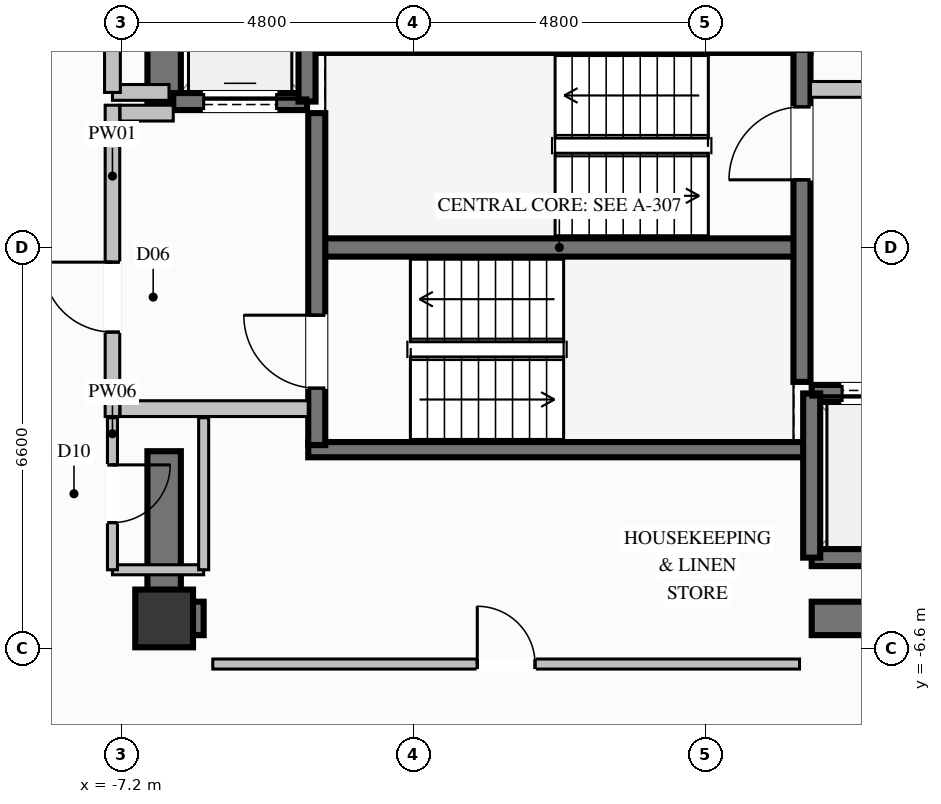
"""IFC4 building model, lengths in metres.
Left out: names, types, materials, properties, quantities, classifications, styles, units other than length and angle.
Written with IfcOpenShell. Run it as: python <this file> out.ifc"""

import sys

from ifc_helpers import new_model, si_unit, direction, frame, frame_2d, origin, origin_2d, place, context, subcontext, project, spatial, rectangle, extrude, element, fill, save


model = new_model("IFC4")
c1 = context("Model", 3, precision=1e-05, world=origin(), true_north=direction((0.0, 1.0)))
c2 = subcontext(c1, "Body", "Model", "MODEL_VIEW")
j1 = project(units=[si_unit("LENGTHUNIT", "METRE"), si_unit("PLANEANGLEUNIT", "RADIAN")], contexts=[c1])
p1 = place(None, origin())
s1 = spatial("IfcSite", under=j1, at=p1, CompositionType="ELEMENT")
p2 = place(p1, origin())
s2 = spatial("IfcBuilding", under=s1, at=p2, CompositionType="ELEMENT")
p3 = place(p2, frame((0.0, 0.0, 202.0)))
s3 = spatial("IfcBuildingStorey", under=s2, at=p3, CompositionType="ELEMENT", Elevation=202.0)
p4 = place(p3, frame((-6.5, -6.1, 0.0), z_axis=(0.0, 0.0, 1.0), x_axis=(1.0, 0.0, 0.0)))
e1 = element("IfcColumn", 1, at=p4, inside=s3, PredefinedType="COLUMN", context=c2, shape_type="SweptSolid", body=[
    extrude(rectangle(XDim=0.95, YDim=0.95, at=origin_2d()), origin(), (0.0, 0.0, 1.0), 3.6),
])
p5 = place(p3, frame((-3.99, 0.0, 0.0), z_axis=(0.0, 0.0, 1.0), x_axis=(1.0, 0.0, 0.0)))
e2 = element("IfcWall", 2, at=p5, inside=s3, PredefinedType="SHEAR", context=c2, shape_type="SweptSolid", body=[
    extrude(rectangle(XDim=7.98, YDim=0.3, at=frame_2d((3.99, 0.0))), origin(), (0.0, 0.0, 1.0), 3.6),
])
for number, where, z_axis, x_axis in (
    (3, (-4.13, -3.325, 0.0), (0.0, 0.0, 1.0), (1.0, 0.0, 0.0)),
    (4, (-4.13, 3.325, 0.0), (0.0, 0.0, 1.0), (1.0, 0.0, 0.0)),
):
    element("IfcWall", number, at=place(p3, frame(where, z_axis=z_axis, x_axis=x_axis)), inside=s3, PredefinedType="SOLIDWALL", context=c2, shape_type="SweptSolid", body=[
        extrude(rectangle(XDim=8.26, YDim=0.25, at=frame_2d((4.13, 0.0))), origin(), (0.0, 0.0, 1.0), 3.6),
    ])
p6 = place(p3, frame((-6.225, -6.1, 0.0), z_axis=(0.0, 0.0, 1.0), x_axis=(1.0, 0.0, 0.0)))
e5 = element("IfcWall", 5, at=p6, inside=s3, PredefinedType="SHEAR", context=c2, shape_type="SweptSolid", body=[
    extrude(rectangle(XDim=0.375, YDim=0.55, at=frame_2d((0.188, 0.0))), origin(), (0.0, 0.0, 1.0), 3.6),
])
p7 = place(p3, frame((4.15, -6.1, 0.0), z_axis=(0.0, 0.0, 1.0), x_axis=(1.0, 0.0, 0.0)))
e6 = element("IfcWall", 6, at=p7, inside=s3, PredefinedType="SHEAR", context=c2, shape_type="SweptSolid", body=[
    extrude(rectangle(XDim=2.075, YDim=0.55, at=frame_2d((1.038, 0.0))), origin(), (0.0, 0.0, 1.0), 3.6),
])
p8 = place(p3, frame((-6.5, 2.35, 0.0), z_axis=(0.0, 0.0, 1.0), x_axis=(0.0, 1.0, 0.0)))
e7 = element("IfcWall", 7, at=p8, inside=s3, PredefinedType="SHEAR", context=c2, shape_type="SweptSolid", body=[
    extrude(rectangle(XDim=4.025, YDim=0.55, at=frame_2d((2.012, 0.0))), origin(), (0.0, 0.0, 1.0), 3.6),
])
p9 = place(p3, frame((-6.5, -6.375, 0.0), z_axis=(0.0, 0.0, 1.0), x_axis=(0.0, 1.0, 0.0)))
e8 = element("IfcWall", 8, at=p9, inside=s3, PredefinedType="SHEAR", context=c2, shape_type="SweptSolid", body=[
    extrude(rectangle(XDim=3.025, YDim=0.55, at=frame_2d((1.512, 0.0))), origin(), (0.0, 0.0, 1.0), 3.6),
])
p10 = place(p3, frame((-6.35, 2.4, 0.0), z_axis=(0.0, 0.0, 1.0), x_axis=(1.0, 0.0, 0.0)))
e9 = element("IfcWall", 9, at=p10, inside=s3, PredefinedType="SOLIDWALL", context=c2, shape_type="SweptSolid", body=[
    extrude(rectangle(XDim=2.2, YDim=0.28, at=frame_2d((1.1, 0.0))), origin(), (0.0, 0.0, 1.0), 3.36),
])
p11 = place(p10, frame((0.5, 0.0, 0.0)))
e10 = element("IfcOpeningElement", 10, at=p11, cuts=e9, PredefinedType="OPENING", context=c2, shape_type="SweptSolid", body=[
    extrude(rectangle(XDim=1.2, YDim=2.2, at=frame_2d((0.6, 1.1))), frame((0.0, 0.15, 0.0), z_axis=(0.0, -1.0, 0.0), x_axis=(1.0, 0.0, 0.0)), (0.0, 0.0, 1.0), 0.3),
])
p12 = place(p3, frame((-4.15, 2.4, 0.0), z_axis=(0.0, 0.0, 1.0), x_axis=(0.0, 1.0, 0.0)))
e11 = element("IfcWall", 11, at=p12, inside=s3, PredefinedType="SOLIDWALL", context=c2, shape_type="SweptSolid", body=[
    extrude(rectangle(XDim=2.7, YDim=0.28, at=frame_2d((1.35, 0.0))), origin(), (0.0, 0.0, 1.0), 3.36),
])
p13 = place(p3, frame((4.15, -5.1, 0.0), z_axis=(0.0, 0.0, 1.0), x_axis=(1.0, 0.0, 0.0)))
e12 = element("IfcWall", 12, at=p13, inside=s3, PredefinedType="SOLIDWALL", context=c2, shape_type="SweptSolid", body=[
    extrude(rectangle(XDim=2.2, YDim=0.28, at=frame_2d((1.1, 0.0))), origin(), (0.0, 0.0, 1.0), 3.36),
])
p14 = place(p3, frame((6.35, -2.4, 0.0), z_axis=(0.0, 0.0, 1.0), x_axis=(-1.0, 0.0, 0.0)))
e13 = element("IfcWall", 13, at=p14, inside=s3, PredefinedType="SOLIDWALL", context=c2, shape_type="SweptSolid", body=[
    extrude(rectangle(XDim=2.2, YDim=0.28, at=frame_2d((1.1, 0.0))), origin(), (0.0, 0.0, 1.0), 3.36),
])
p15 = place(p14, frame((0.5, 0.0, 0.0)))
e14 = element("IfcOpeningElement", 14, at=p15, cuts=e13, PredefinedType="OPENING", context=c2, shape_type="SweptSolid", body=[
    extrude(rectangle(XDim=1.2, YDim=2.2, at=frame_2d((0.6, 1.1))), frame((0.0, 0.15, 0.0), z_axis=(0.0, -1.0, 0.0), x_axis=(1.0, 0.0, 0.0)), (0.0, 0.0, 1.0), 0.3),
])
p16 = place(p3, frame((4.15, -2.4, 0.0), z_axis=(0.0, 0.0, 1.0), x_axis=(0.0, -1.0, 0.0)))
e15 = element("IfcWall", 15, at=p16, inside=s3, PredefinedType="SOLIDWALL", context=c2, shape_type="SweptSolid", body=[
    extrude(rectangle(XDim=2.7, YDim=0.28, at=frame_2d((1.35, 0.0))), origin(), (0.0, 0.0, 1.0), 3.36),
])
p17 = place(p3, frame((-3.99, -3.25, 0.0), z_axis=(0.0, 0.0, 1.0), x_axis=(0.0, 1.0, 0.0)))
e16 = element("IfcWall", 16, at=p17, inside=s3, PredefinedType="SOLIDWALL", context=c2, shape_type="SweptSolid", body=[
    extrude(rectangle(XDim=5.46, YDim=0.28, at=frame_2d((2.73, 0.0))), origin(), (0.0, 0.0, 1.0), 3.36),
])
p18 = place(p17, frame((0.937, 0.0, 0.0)))
e17 = element("IfcOpeningElement", 17, at=p18, cuts=e16, PredefinedType="OPENING", context=c2, shape_type="SweptSolid", body=[
    extrude(rectangle(XDim=1.2, YDim=2.2, at=frame_2d((0.6, 1.1))), frame((0.0, 0.15, 0.0), z_axis=(0.0, -1.0, 0.0), x_axis=(1.0, 0.0, 0.0)), (0.0, 0.0, 1.0), 0.3),
])
p19 = place(p3, frame((3.99, -2.21, 0.0), z_axis=(0.0, 0.0, 1.0), x_axis=(0.0, 1.0, 0.0)))
e18 = element("IfcWall", 18, at=p19, inside=s3, PredefinedType="SOLIDWALL", context=c2, shape_type="SweptSolid", body=[
    extrude(rectangle(XDim=5.46, YDim=0.28, at=frame_2d((2.73, 0.0))), origin(), (0.0, 0.0, 1.0), 3.36),
])
p20 = place(p19, frame((3.323, 0.0, 0.0)))
e19 = element("IfcOpeningElement", 19, at=p20, cuts=e18, PredefinedType="OPENING", context=c2, shape_type="SweptSolid", body=[
    extrude(rectangle(XDim=1.2, YDim=2.2, at=frame_2d((0.6, 1.1))), frame((0.0, 0.15, 0.0), z_axis=(0.0, -1.0, 0.0), x_axis=(1.0, 0.0, 0.0)), (0.0, 0.0, 1.0), 0.3),
])
p21 = place(p3, frame((-7.35, -2.78, 0.0), z_axis=(0.0, 0.0, 1.0), x_axis=(0.0, 1.0, 0.0)))
e20 = element("IfcWall", 20, at=p21, inside=s3, PredefinedType="PARTITIONING", context=c2, shape_type="SweptSolid", body=[
    extrude(rectangle(XDim=5.12, YDim=0.24, at=frame_2d((2.56, 0.0))), origin(), (0.0, 0.0, 1.0), 2.445),
])
p22 = place(p21, frame((1.389, 0.0, 0.0)))
e21 = element("IfcOpeningElement", 21, at=p22, cuts=e20, PredefinedType="OPENING", context=c2, shape_type="SweptSolid", body=[
    extrude(rectangle(XDim=1.15, YDim=2.2, at=frame_2d((0.575, 1.1))), frame((0.0, 0.13, 0.0), z_axis=(0.0, -1.0, 0.0), x_axis=(1.0, 0.0, 0.0)), (0.0, 0.0, 1.0), 0.26),
])
p23 = place(p3, frame((-7.225, -2.65, 0.0), z_axis=(0.0, 0.0, 1.0), x_axis=(1.0, 0.0, 0.0)))
e22 = element("IfcWall", 22, at=p23, inside=s3, PredefinedType="PARTITIONING", context=c2, shape_type="SweptSolid", body=[
    extrude(rectangle(XDim=3.095, YDim=0.26, at=frame_2d((1.548, 0.0))), origin(), (0.0, 0.0, 1.0), 3.36),
])
p24 = place(p3, frame((-7.225, 2.21, 0.0), z_axis=(0.0, 0.0, 1.0), x_axis=(1.0, 0.0, 0.0)))
e23 = element("IfcWall", 23, at=p24, inside=s3, PredefinedType="PARTITIONING", context=c2, shape_type="SweptSolid", body=[
    extrude(rectangle(XDim=0.875, YDim=0.26, at=frame_2d((0.438, 0.0))), origin(), (0.0, 0.0, 1.0), 3.36),
])
p25 = place(p3, frame((4.13, 2.6, 0.0), z_axis=(0.0, 0.0, 1.0), x_axis=(1.0, 0.0, 0.0)))
e24 = element("IfcWall", 24, at=p25, inside=s3, PredefinedType="PARTITIONING", context=c2, shape_type="SweptSolid", body=[
    extrude(rectangle(XDim=3.095, YDim=0.26, at=frame_2d((1.548, 0.0))), origin(), (0.0, 0.0, 1.0), 3.36),
])
p26 = place(p3, frame((-7.35, 2.55, 0.0), z_axis=(0.0, 0.0, 1.0), x_axis=(1.0, 0.0, 0.0)))
e25 = element("IfcWall", 25, at=p26, inside=s3, PredefinedType="PARTITIONING", context=c2, shape_type="SweptSolid", body=[
    extrude(rectangle(XDim=0.93, YDim=0.26, at=frame_2d((0.465, 0.0))), origin(), (0.0, 0.0, 1.0), 3.36),
])
p27 = place(p3, frame((-7.35, 2.55, 0.0), z_axis=(0.0, 0.0, 1.0), x_axis=(0.0, 1.0, 0.0)))
e26 = element("IfcWall", 26, at=p27, inside=s3, PredefinedType="PARTITIONING", context=c2, shape_type="SweptSolid", body=[
    extrude(rectangle(XDim=2.4, YDim=0.26, at=frame_2d((1.2, 0.0))), origin(), (0.0, 0.0, 1.0), 2.445),
])
p28 = place(p27, frame((0.775, 0.0, 0.0)))
e27 = element("IfcOpeningElement", 27, at=p28, cuts=e26, PredefinedType="OPENING", context=c2, shape_type="SweptSolid", body=[
    extrude(rectangle(XDim=0.85, YDim=2.05, at=frame_2d((0.425, 1.025))), frame((0.0, 0.14, 0.0), z_axis=(0.0, -1.0, 0.0), x_axis=(1.0, 0.0, 0.0)), (0.0, 0.0, 1.0), 0.28),
])
p29 = place(p3, frame((-7.35, -5.3, 0.0), z_axis=(0.0, 0.0, 1.0), x_axis=(1.0, 0.0, 0.0)))
e28 = element("IfcWall", 28, at=p29, inside=s3, PredefinedType="PARTITIONING", context=c2, shape_type="SweptSolid", body=[
    extrude(rectangle(XDim=1.5, YDim=0.165, at=frame_2d((0.75, 0.0))), origin(), (0.0, 0.0, 1.0), 2.445),
])
p30 = place(p3, frame((-5.85, -5.3, 0.0), z_axis=(0.0, 0.0, 1.0), x_axis=(0.0, 1.0, 0.0)))
e29 = element("IfcWall", 29, at=p30, inside=s3, PredefinedType="PARTITIONING", context=c2, shape_type="SweptSolid", body=[
    extrude(rectangle(XDim=2.5, YDim=0.165, at=frame_2d((1.25, 0.0))), origin(), (0.0, 0.0, 1.0), 2.445),
])
p31 = place(p3, frame((-7.35, -2.8, 0.0), z_axis=(0.0, 0.0, 1.0), x_axis=(0.0, -1.0, 0.0)))
e30 = element("IfcWall", 30, at=p31, inside=s3, PredefinedType="PARTITIONING", context=c2, shape_type="SweptSolid", body=[
    extrude(rectangle(XDim=2.5, YDim=0.165, at=frame_2d((1.25, 0.0))), origin(), (0.0, 0.0, 1.0), 3.36),
])
p32 = place(p31, frame((0.775, 0.0, 0.0)))
e31 = element("IfcOpeningElement", 31, at=p32, cuts=e30, PredefinedType="OPENING", context=c2, shape_type="SweptSolid", body=[
    extrude(rectangle(XDim=0.95, YDim=2.1, at=frame_2d((0.475, 1.05))), frame((0.0, 0.093, 0.0), z_axis=(0.0, -1.0, 0.0), x_axis=(1.0, 0.0, 0.0)), (0.0, 0.0, 1.0), 0.185),
])
p33 = place(p3, frame((-5.7, -6.85, 0.0), z_axis=(0.0, 0.0, 1.0), x_axis=(1.0, 0.0, 0.0)))
e32 = element("IfcWall", 32, at=p33, inside=s3, PredefinedType="PARTITIONING", context=c2, shape_type="SweptSolid", body=[
    extrude(rectangle(XDim=9.65, YDim=0.165, at=frame_2d((4.825, 0.0))), origin(), (0.0, 0.0, 1.0), 2.445),
])
p34 = place(p33, frame((4.35, 0.0, 0.0)))
e33 = element("IfcOpeningElement", 33, at=p34, cuts=e32, PredefinedType="OPENING", context=c2, shape_type="SweptSolid", body=[
    extrude(rectangle(XDim=0.95, YDim=2.1, at=frame_2d((0.475, 1.05))), frame((0.0, 0.093, 0.0), z_axis=(0.0, -1.0, 0.0), x_axis=(1.0, 0.0, 0.0)), (0.0, 0.0, 1.0), 0.185),
])
p35 = place(p11, origin())
e34 = element("IfcDoor", 34, at=p35, inside=s3, OperationType="SLIDING_TO_LEFT", PredefinedType="DOOR", context=c2, shape_type="SweptSolid", body=[
    extrude(rectangle(XDim=1.2, YDim=2.2, at=frame_2d((0.6, 1.1))), frame((0.0, 0.025, 0.0), z_axis=(0.0, -1.0, 0.0), x_axis=(1.0, 0.0, 0.0)), (0.0, 0.0, 1.0), 0.05),
])
fill(e10, e34)
p36 = place(p15, origin())
e35 = element("IfcDoor", 35, at=p36, inside=s3, OperationType="SLIDING_TO_LEFT", PredefinedType="DOOR", context=c2, shape_type="SweptSolid", body=[
    extrude(rectangle(XDim=1.2, YDim=2.2, at=frame_2d((0.6, 1.1))), frame((0.0, 0.025, 0.0), z_axis=(0.0, -1.0, 0.0), x_axis=(1.0, 0.0, 0.0)), (0.0, 0.0, 1.0), 0.05),
])
fill(e14, e35)
p37 = place(p18, origin())
e36 = element("IfcDoor", 36, at=p37, inside=s3, OperationType="SINGLE_SWING_RIGHT", PredefinedType="DOOR", context=c2, shape_type="SweptSolid", body=[
    extrude(rectangle(XDim=1.2, YDim=2.2, at=frame_2d((0.6, 1.1))), frame((0.0, 0.025, 0.0), z_axis=(0.0, -1.0, 0.0), x_axis=(1.0, 0.0, 0.0)), (0.0, 0.0, 1.0), 0.05),
])
fill(e17, e36)
p38 = place(p20, origin())
e37 = element("IfcDoor", 37, at=p38, inside=s3, OperationType="SINGLE_SWING_LEFT", PredefinedType="DOOR", context=c2, shape_type="SweptSolid", body=[
    extrude(rectangle(XDim=1.2, YDim=2.2, at=frame_2d((0.6, 1.1))), frame((0.0, 0.025, 0.0), z_axis=(0.0, -1.0, 0.0), x_axis=(1.0, 0.0, 0.0)), (0.0, 0.0, 1.0), 0.05),
])
fill(e19, e37)
p39 = place(p22, origin())
e38 = element("IfcDoor", 38, at=p39, inside=s3, OperationType="SINGLE_SWING_RIGHT", PredefinedType="DOOR", context=c2, shape_type="SweptSolid", body=[
    extrude(rectangle(XDim=1.15, YDim=2.2, at=frame_2d((0.575, 1.1))), frame((0.0, 0.025, 0.0), z_axis=(0.0, -1.0, 0.0), x_axis=(1.0, 0.0, 0.0)), (0.0, 0.0, 1.0), 0.05),
])
fill(e21, e38)
p40 = place(p32, origin())
e39 = element("IfcDoor", 39, at=p40, inside=s3, OperationType="SINGLE_SWING_LEFT", PredefinedType="DOOR", context=c2, shape_type="SweptSolid", body=[
    extrude(rectangle(XDim=0.95, YDim=2.1, at=frame_2d((0.475, 1.05))), frame((0.0, 0.025, 0.0), z_axis=(0.0, -1.0, 0.0), x_axis=(1.0, 0.0, 0.0)), (0.0, 0.0, 1.0), 0.05),
])
fill(e31, e39)
p41 = place(p34, origin())
e40 = element("IfcDoor", 40, at=p41, inside=s3, OperationType="SINGLE_SWING_LEFT", PredefinedType="DOOR", context=c2, shape_type="SweptSolid", body=[
    extrude(rectangle(XDim=0.95, YDim=2.1, at=frame_2d((0.475, 1.05))), frame((0.0, 0.025, 0.0), z_axis=(0.0, -1.0, 0.0), x_axis=(1.0, 0.0, 0.0)), (0.0, 0.0, 1.0), 0.05),
])
fill(e33, e40)
save(model, sys.argv[1])
